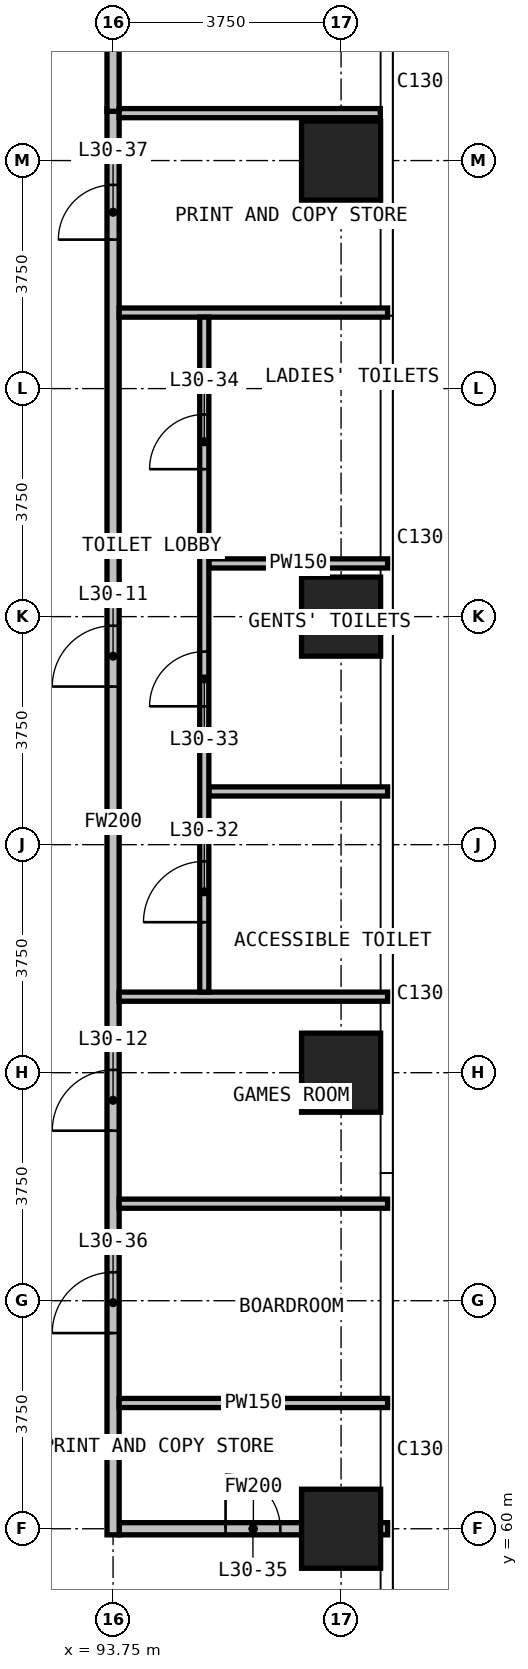
"""IFC4 building model, lengths in metres.
Left out: names, types, materials, properties, quantities, classifications, styles, units other than length and angle.
Written with IfcOpenShell. Run it as: python <this file> out.ifc"""

import sys

from ifc_helpers import new_model, si_unit, direction, frame, frame_2d, origin, origin_2d, place, context, subcontext, project, spatial, rectangle, extrude, element, fill, save


model = new_model("IFC4")
c1 = context("Model", 3, precision=1e-05, world=origin(), true_north=direction((0.0, 1.0)))
c2 = subcontext(c1, "Body", "Model", "MODEL_VIEW")
j1 = project(units=[si_unit("LENGTHUNIT", "METRE"), si_unit("PLANEANGLEUNIT", "RADIAN")], contexts=[c1])
p1 = place(None, origin())
s1 = spatial("IfcSite", under=j1, at=p1, CompositionType="ELEMENT")
p2 = place(p1, origin())
s2 = spatial("IfcBuilding", under=s1, at=p2, CompositionType="ELEMENT")
p3 = place(p2, frame((0.0, 0.0, 121.6)))
s3 = spatial("IfcBuildingStorey", under=s2, at=p3, CompositionType="ELEMENT", Elevation=121.6)
for number, where, z_axis, x_axis in (
    (1, (97.5, 60.0, 0.0), (0.0, 0.0, 1.0), (1.0, 0.0, 0.0)),
    (2, (97.5, 67.5, 0.0), (0.0, 0.0, 1.0), (1.0, 0.0, 0.0)),
    (3, (97.5, 75.0, 0.0), (0.0, 0.0, 1.0), (1.0, 0.0, 0.0)),
    (4, (97.5, 82.5, 0.0), (0.0, 0.0, 1.0), (1.0, 0.0, 0.0)),
):
    element("IfcColumn", number, at=place(p3, frame(where, z_axis=z_axis, x_axis=x_axis)), inside=s3, PredefinedType="COLUMN", context=c2, shape_type="SweptSolid", body=[
        extrude(rectangle(XDim=1.3, YDim=1.3, at=origin_2d()), origin(), (0.0, 0.0, 1.0), 3.6),
    ])
p4 = place(p3, frame((93.85, 60.0, 0.0), z_axis=(0.0, 0.0, 1.0), x_axis=(1.0, 0.0, 0.0)))
e5 = element("IfcWall", 5, at=p4, inside=s3, PredefinedType="PARTITIONING", context=c2, shape_type="SweptSolid", body=[
    extrude(rectangle(XDim=4.415, YDim=0.2, at=frame_2d((2.208, 0.0))), origin(), (0.0, 0.0, 1.0), 3.3),
])
p5 = place(p4, frame((1.75, 0.0, 0.0)))
e6 = element("IfcOpeningElement", 6, at=p5, cuts=e5, PredefinedType="OPENING", context=c2, shape_type="SweptSolid", body=[
    extrude(rectangle(XDim=0.9, YDim=2.2, at=frame_2d((0.45, 1.1))), frame((0.0, 0.11, 0.0), z_axis=(0.0, -1.0, 0.0), x_axis=(1.0, 0.0, 0.0)), (0.0, 0.0, 1.0), 0.22),
])
p6 = place(p3, frame((93.75, 59.9, 0.0), z_axis=(0.0, 0.0, 1.0), x_axis=(0.0, 1.0, 0.0)))
e7 = element("IfcWall", 7, at=p6, inside=s3, PredefinedType="PARTITIONING", context=c2, shape_type="SweptSolid", body=[
    extrude(rectangle(XDim=23.455, YDim=0.2, at=frame_2d((11.728, 0.0))), origin(), (0.0, 0.0, 1.0), 3.3),
])
p7 = place(p6, frame((13.95, 0.0, 0.0)))
e8 = element("IfcOpeningElement", 8, at=p7, cuts=e7, PredefinedType="OPENING", context=c2, shape_type="SweptSolid", body=[
    extrude(rectangle(XDim=1.0, YDim=2.2, at=frame_2d((0.5, 1.1))), frame((0.0, 0.11, 0.0), z_axis=(0.0, -1.0, 0.0), x_axis=(1.0, 0.0, 0.0)), (0.0, 0.0, 1.0), 0.22),
])
p8 = place(p6, frame((6.646, 0.0, 0.0)))
e9 = element("IfcOpeningElement", 9, at=p8, cuts=e7, PredefinedType="OPENING", context=c2, shape_type="SweptSolid", body=[
    extrude(rectangle(XDim=1.0, YDim=2.2, at=frame_2d((0.5, 1.1))), frame((0.0, 0.11, 0.0), z_axis=(0.0, -1.0, 0.0), x_axis=(1.0, 0.0, 0.0)), (0.0, 0.0, 1.0), 0.22),
])
p9 = place(p6, frame((3.318, 0.0, 0.0)))
e10 = element("IfcOpeningElement", 10, at=p9, cuts=e7, PredefinedType="OPENING", context=c2, shape_type="SweptSolid", body=[
    extrude(rectangle(XDim=1.0, YDim=2.2, at=frame_2d((0.5, 1.1))), frame((0.0, 0.11, 0.0), z_axis=(0.0, -1.0, 0.0), x_axis=(1.0, 0.0, 0.0)), (0.0, 0.0, 1.0), 0.22),
])
p10 = place(p6, frame((21.3, 0.0, 0.0)))
e11 = element("IfcOpeningElement", 11, at=p10, cuts=e7, PredefinedType="OPENING", context=c2, shape_type="SweptSolid", body=[
    extrude(rectangle(XDim=0.9, YDim=2.2, at=frame_2d((0.45, 1.1))), frame((0.0, 0.11, 0.0), z_axis=(0.0, -1.0, 0.0), x_axis=(1.0, 0.0, 0.0)), (0.0, 0.0, 1.0), 0.22),
])
p11 = place(p3, frame((93.75, 83.31, 0.0), z_axis=(0.0, 0.0, 1.0), x_axis=(0.0, 1.0, 0.0)))
e12 = element("IfcWall", 12, at=p11, inside=s3, PredefinedType="PARTITIONING", context=c2, shape_type="SweptSolid", body=[
    extrude(rectangle(XDim=7.335, YDim=0.2, at=frame_2d((3.667, 0.0))), origin(), (0.0, 0.0, 1.0), 3.3),
])
for number, where, z_axis, x_axis in (
    (13, (93.85, 62.068, 0.0), (0.0, 0.0, 1.0), (1.0, 0.0, 0.0)),
    (14, (93.85, 65.346, 0.0), (0.0, 0.0, 1.0), (1.0, 0.0, 0.0)),
    (15, (93.85, 68.75, 0.0), (0.0, 0.0, 1.0), (1.0, 0.0, 0.0)),
):
    element("IfcWall", number, at=place(p3, frame(where, z_axis=z_axis, x_axis=x_axis)), inside=s3, PredefinedType="PARTITIONING", context=c2, shape_type="SweptSolid", body=[
        extrude(rectangle(XDim=4.415, YDim=0.15, at=frame_2d((2.208, 0.0))), origin(), (0.0, 0.0, 1.0), 3.3),
    ])
for number, where, z_axis, x_axis in (
    (16, (95.325, 72.125, 0.0), (0.0, 0.0, 1.0), (1.0, 0.0, 0.0)),
    (17, (95.325, 75.875, 0.0), (0.0, 0.0, 1.0), (1.0, 0.0, 0.0)),
):
    element("IfcWall", number, at=place(p3, frame(where, z_axis=z_axis, x_axis=x_axis)), inside=s3, PredefinedType="PARTITIONING", context=c2, shape_type="SweptSolid", body=[
        extrude(rectangle(XDim=2.94, YDim=0.15, at=frame_2d((1.47, 0.0))), origin(), (0.0, 0.0, 1.0), 3.3),
    ])
p12 = place(p3, frame((93.85, 80.0, 0.0), z_axis=(0.0, 0.0, 1.0), x_axis=(1.0, 0.0, 0.0)))
e18 = element("IfcWall", 18, at=p12, inside=s3, PredefinedType="PARTITIONING", context=c2, shape_type="SweptSolid", body=[
    extrude(rectangle(XDim=4.415, YDim=0.15, at=frame_2d((2.208, 0.0))), origin(), (0.0, 0.0, 1.0), 3.3),
])
p13 = place(p3, frame((93.85, 83.28, 0.0), z_axis=(0.0, 0.0, 1.0), x_axis=(1.0, 0.0, 0.0)))
e19 = element("IfcWall", 19, at=p13, inside=s3, PredefinedType="PARTITIONING", context=c2, shape_type="SweptSolid", body=[
    extrude(rectangle(XDim=4.295, YDim=0.15, at=frame_2d((2.147, 0.0))), origin(), (0.0, 0.0, 1.0), 3.3),
])
p14 = place(p3, frame((95.25, 68.825, 0.0), z_axis=(0.0, 0.0, 1.0), x_axis=(0.0, 1.0, 0.0)))
e20 = element("IfcWall", 20, at=p14, inside=s3, PredefinedType="PARTITIONING", context=c2, shape_type="SweptSolid", body=[
    extrude(rectangle(XDim=11.1, YDim=0.15, at=frame_2d((5.55, 0.0))), origin(), (0.0, 0.0, 1.0), 3.3),
])
p15 = place(p14, frame((1.15, 0.0, 0.0)))
e21 = element("IfcOpeningElement", 21, at=p15, cuts=e20, PredefinedType="OPENING", context=c2, shape_type="SweptSolid", body=[
    extrude(rectangle(XDim=1.0, YDim=2.2, at=frame_2d((0.5, 1.1))), frame((0.0, 0.085, 0.0), z_axis=(0.0, -1.0, 0.0), x_axis=(1.0, 0.0, 0.0)), (0.0, 0.0, 1.0), 0.17),
])
p16 = place(p14, frame((4.7, 0.0, 0.0)))
e22 = element("IfcOpeningElement", 22, at=p16, cuts=e20, PredefinedType="OPENING", context=c2, shape_type="SweptSolid", body=[
    extrude(rectangle(XDim=0.9, YDim=2.2, at=frame_2d((0.45, 1.1))), frame((0.0, 0.085, 0.0), z_axis=(0.0, -1.0, 0.0), x_axis=(1.0, 0.0, 0.0)), (0.0, 0.0, 1.0), 0.17),
])
p17 = place(p14, frame((8.6, 0.0, 0.0)))
e23 = element("IfcOpeningElement", 23, at=p17, cuts=e20, PredefinedType="OPENING", context=c2, shape_type="SweptSolid", body=[
    extrude(rectangle(XDim=0.9, YDim=2.2, at=frame_2d((0.45, 1.1))), frame((0.0, 0.085, 0.0), z_axis=(0.0, -1.0, 0.0), x_axis=(1.0, 0.0, 0.0)), (0.0, 0.0, 1.0), 0.17),
])
p18 = place(p7, origin())
e24 = element("IfcDoor", 24, at=p18, inside=s3, OperationType="SINGLE_SWING_RIGHT", PredefinedType="DOOR", context=c2, shape_type="SweptSolid", body=[
    extrude(rectangle(XDim=1.0, YDim=2.2, at=frame_2d((0.5, 1.1))), frame((0.0, 0.025, 0.0), z_axis=(0.0, -1.0, 0.0), x_axis=(1.0, 0.0, 0.0)), (0.0, 0.0, 1.0), 0.05),
])
fill(e8, e24)
p19 = place(p8, origin())
e25 = element("IfcDoor", 25, at=p19, inside=s3, OperationType="SINGLE_SWING_LEFT", PredefinedType="DOOR", context=c2, shape_type="SweptSolid", body=[
    extrude(rectangle(XDim=1.0, YDim=2.2, at=frame_2d((0.5, 1.1))), frame((0.0, 0.025, 0.0), z_axis=(0.0, -1.0, 0.0), x_axis=(1.0, 0.0, 0.0)), (0.0, 0.0, 1.0), 0.05),
])
fill(e9, e25)
p20 = place(p15, origin())
e26 = element("IfcDoor", 26, at=p20, inside=s3, OperationType="SINGLE_SWING_RIGHT", PredefinedType="DOOR", context=c2, shape_type="SweptSolid", body=[
    extrude(rectangle(XDim=1.0, YDim=2.2, at=frame_2d((0.5, 1.1))), frame((0.0, 0.025, 0.0), z_axis=(0.0, -1.0, 0.0), x_axis=(1.0, 0.0, 0.0)), (0.0, 0.0, 1.0), 0.05),
])
fill(e21, e26)
p21 = place(p16, origin())
e27 = element("IfcDoor", 27, at=p21, inside=s3, OperationType="SINGLE_SWING_LEFT", PredefinedType="DOOR", context=c2, shape_type="SweptSolid", body=[
    extrude(rectangle(XDim=0.9, YDim=2.2, at=frame_2d((0.45, 1.1))), frame((0.0, 0.025, 0.0), z_axis=(0.0, -1.0, 0.0), x_axis=(1.0, 0.0, 0.0)), (0.0, 0.0, 1.0), 0.05),
])
fill(e22, e27)
p22 = place(p17, origin())
e28 = element("IfcDoor", 28, at=p22, inside=s3, OperationType="SINGLE_SWING_LEFT", PredefinedType="DOOR", context=c2, shape_type="SweptSolid", body=[
    extrude(rectangle(XDim=0.9, YDim=2.2, at=frame_2d((0.45, 1.1))), frame((0.0, 0.025, 0.0), z_axis=(0.0, -1.0, 0.0), x_axis=(1.0, 0.0, 0.0)), (0.0, 0.0, 1.0), 0.05),
])
fill(e23, e28)
p23 = place(p5, origin())
e29 = element("IfcDoor", 29, at=p23, inside=s3, OperationType="SINGLE_SWING_LEFT", PredefinedType="DOOR", context=c2, shape_type="SweptSolid", body=[
    extrude(rectangle(XDim=0.9, YDim=2.2, at=frame_2d((0.45, 1.1))), frame((0.0, 0.025, 0.0), z_axis=(0.0, -1.0, 0.0), x_axis=(1.0, 0.0, 0.0)), (0.0, 0.0, 1.0), 0.05),
])
fill(e6, e29)
p24 = place(p9, origin())
e30 = element("IfcDoor", 30, at=p24, inside=s3, OperationType="SINGLE_SWING_RIGHT", PredefinedType="DOOR", context=c2, shape_type="SweptSolid", body=[
    extrude(rectangle(XDim=1.0, YDim=2.2, at=frame_2d((0.5, 1.1))), frame((0.0, 0.025, 0.0), z_axis=(0.0, -1.0, 0.0), x_axis=(1.0, 0.0, 0.0)), (0.0, 0.0, 1.0), 0.05),
])
fill(e10, e30)
p25 = place(p10, origin())
e31 = element("IfcDoor", 31, at=p25, inside=s3, OperationType="SINGLE_SWING_LEFT", PredefinedType="DOOR", context=c2, shape_type="SweptSolid", body=[
    extrude(rectangle(XDim=0.9, YDim=2.2, at=frame_2d((0.45, 1.1))), frame((0.0, 0.025, 0.0), z_axis=(0.0, -1.0, 0.0), x_axis=(1.0, 0.0, 0.0)), (0.0, 0.0, 1.0), 0.05),
])
fill(e11, e31)
save(model, sys.argv[1])
